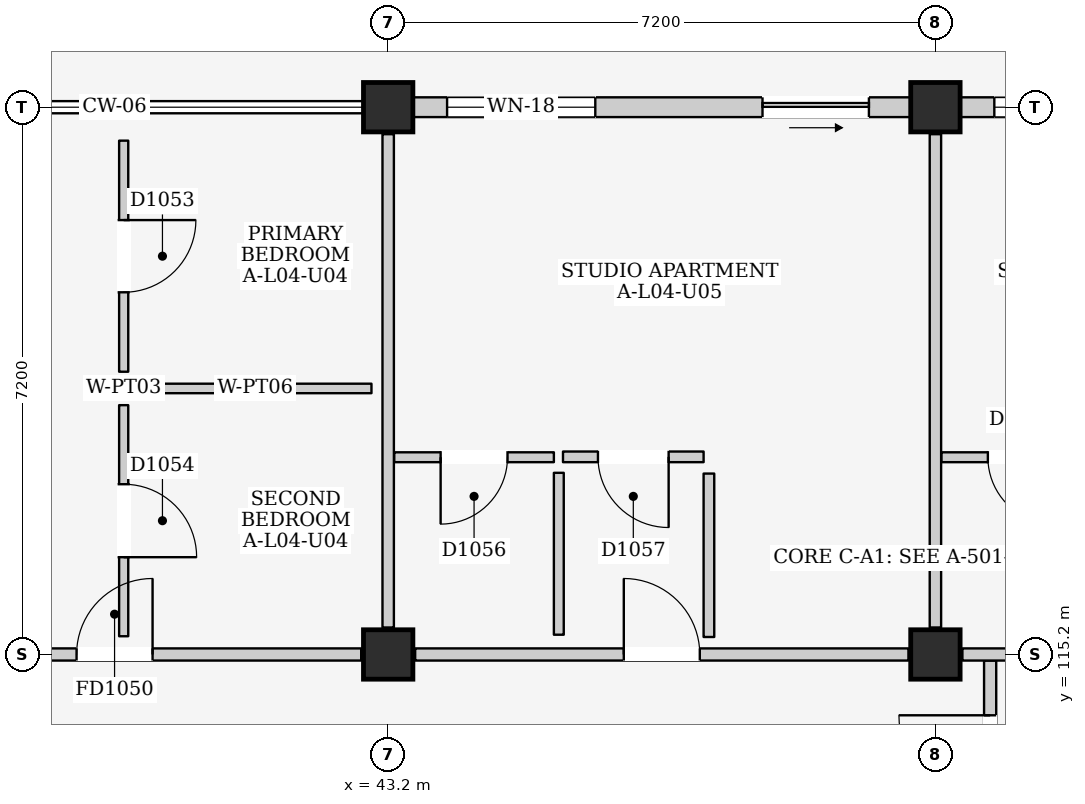
"""IFC4 building model, lengths in metres.
Left out: names, types, materials, properties, quantities, classifications, styles, units other than length and angle.
Written with IfcOpenShell. Run it as: python <this file> out.ifc"""

import sys

from ifc_helpers import new_model, si_unit, direction, frame, frame_2d, origin, origin_2d, place, context, subcontext, project, spatial, rectangle, extrude, element, fill, save


model = new_model("IFC4")
c1 = context("Model", 3, precision=1e-05, world=origin(), true_north=direction((0.0, 1.0)))
c2 = subcontext(c1, "Body", "Model", "MODEL_VIEW")
j1 = project(units=[si_unit("LENGTHUNIT", "METRE"), si_unit("PLANEANGLEUNIT", "RADIAN")], contexts=[c1])
p1 = place(None, origin())
s1 = spatial("IfcSite", under=j1, at=p1, CompositionType="ELEMENT")
p2 = place(p1, origin())
s2 = spatial("IfcBuilding", under=s1, at=p2, CompositionType="ELEMENT")
p3 = place(p2, frame((0.0, 0.0, 15.4)))
s3 = spatial("IfcBuildingStorey", under=s2, at=p3, CompositionType="ELEMENT", Elevation=15.4)
for number, where, z_axis, x_axis in (
    (1, (43.2, 115.2, 0.0), (0.0, 0.0, 1.0), (1.0, 0.0, 0.0)),
    (2, (43.2, 122.4, 0.0), (0.0, 0.0, 1.0), (1.0, 0.0, 0.0)),
    (3, (50.4, 115.2, 0.0), (0.0, 0.0, 1.0), (1.0, 0.0, 0.0)),
    (4, (50.4, 122.4, 0.0), (0.0, 0.0, 1.0), (1.0, 0.0, 0.0)),
):
    element("IfcColumn", number, at=place(p3, frame(where, z_axis=z_axis, x_axis=x_axis)), inside=s3, PredefinedType="COLUMN", context=c2, shape_type="SweptSolid", body=[
        extrude(rectangle(XDim=0.65, YDim=0.65, at=origin_2d()), origin(), (0.0, 0.0, 1.0), 3.2),
    ])
p4 = place(p3, frame((43.525, 122.4, 0.0), z_axis=(0.0, 0.0, 1.0), x_axis=(1.0, 0.0, 0.0)))
e5 = element("IfcWall", 5, at=p4, inside=s3, PredefinedType="ELEMENTEDWALL", context=c2, shape_type="SweptSolid", body=[
    extrude(rectangle(XDim=6.55, YDim=0.26, at=frame_2d((3.275, 0.0))), origin(), (0.0, 0.0, 1.0), 2.43),
])
p5 = place(p4, frame((4.6, 0.0, 0.0)))
e6 = element("IfcOpeningElement", 6, at=p5, cuts=e5, PredefinedType="OPENING", context=c2, shape_type="SweptSolid", body=[
    extrude(rectangle(XDim=1.4, YDim=2.1, at=frame_2d((0.7, 1.05))), frame((0.0, 0.145, 0.0), z_axis=(0.0, -1.0, 0.0), x_axis=(1.0, 0.0, 0.0)), (0.0, 0.0, 1.0), 0.29),
])
p6 = place(p4, frame((0.45, 0.0, 0.76)))
e7 = element("IfcOpeningElement", 7, at=p6, cuts=e5, PredefinedType="OPENING", context=c2, shape_type="SweptSolid", body=[
    extrude(rectangle(XDim=1.95, YDim=1.55, at=frame_2d((0.975, 0.775))), frame((0.0, 0.145, 0.0), z_axis=(0.0, -1.0, 0.0), x_axis=(1.0, 0.0, 0.0)), (0.0, 0.0, 1.0), 0.29),
])
p7 = place(p3, frame((50.725, 122.4, 0.0), z_axis=(0.0, 0.0, 1.0), x_axis=(1.0, 0.0, 0.0)))
e8 = element("IfcWall", 8, at=p7, inside=s3, PredefinedType="ELEMENTEDWALL", context=c2, shape_type="SweptSolid", body=[
    extrude(rectangle(XDim=6.55, YDim=0.26, at=frame_2d((3.275, 0.0))), origin(), (0.0, 0.0, 1.0), 2.43),
])
p8 = place(p7, frame((4.2, 0.0, 0.0)))
e9 = element("IfcOpeningElement", 9, at=p8, cuts=e8, PredefinedType="OPENING", context=c2, shape_type="SweptSolid", body=[
    extrude(rectangle(XDim=1.8, YDim=2.12, at=frame_2d((0.9, 1.06))), frame((0.0, 0.145, 0.0), z_axis=(0.0, -1.0, 0.0), x_axis=(1.0, 0.0, 0.0)), (0.0, 0.0, 1.0), 0.29),
])
p9 = place(p7, frame((0.45, 0.0, 0.9)))
e10 = element("IfcOpeningElement", 10, at=p9, cuts=e8, PredefinedType="OPENING", context=c2, shape_type="SweptSolid", body=[
    extrude(rectangle(XDim=1.65, YDim=1.35, at=frame_2d((0.825, 0.675))), frame((0.0, 0.145, 0.0), z_axis=(0.0, -1.0, 0.0), x_axis=(1.0, 0.0, 0.0)), (0.0, 0.0, 1.0), 0.29),
])
p10 = place(p3, frame((51.12, 111.1, 0.0), z_axis=(0.0, 0.0, 1.0), x_axis=(0.0, 1.0, 0.0)))
e11 = element("IfcWall", 11, at=p10, inside=s3, PredefinedType="PARTITIONING", context=c2, shape_type="SweptSolid", body=[
    extrude(rectangle(XDim=4.02, YDim=0.16, at=frame_2d((2.01, 0.0))), origin(), (0.0, 0.0, 1.0), 2.95),
])
p11 = place(p10, frame((2.1, 0.0, 0.0)))
e12 = element("IfcOpeningElement", 12, at=p11, cuts=e11, PredefinedType="OPENING", context=c2, shape_type="SweptSolid", body=[
    extrude(rectangle(XDim=1.2, YDim=2.2, at=frame_2d((0.6, 1.1))), frame((0.0, 0.095, 0.0), z_axis=(0.0, -1.0, 0.0), x_axis=(1.0, 0.0, 0.0)), (0.0, 0.0, 1.0), 0.19),
])
p12 = place(p3, frame((36.355, 115.2, 0.0), z_axis=(0.0, 0.0, 1.0), x_axis=(1.0, 0.0, 0.0)))
e13 = element("IfcWall", 13, at=p12, inside=s3, PredefinedType="PARTITIONING", context=c2, shape_type="SweptSolid", body=[
    extrude(rectangle(XDim=6.49, YDim=0.16, at=frame_2d((3.245, 0.0))), origin(), (0.0, 0.0, 1.0), 2.285),
])
p13 = place(p12, frame((2.745, 0.0, 0.0)))
e14 = element("IfcOpeningElement", 14, at=p13, cuts=e13, PredefinedType="OPENING", context=c2, shape_type="SweptSolid", body=[
    extrude(rectangle(XDim=1.0, YDim=2.15, at=frame_2d((0.5, 1.075))), frame((0.0, 0.095, 0.0), z_axis=(0.0, -1.0, 0.0), x_axis=(1.0, 0.0, 0.0)), (0.0, 0.0, 1.0), 0.19),
])
p14 = place(p3, frame((43.2, 115.555, 0.0), z_axis=(0.0, 0.0, 1.0), x_axis=(0.0, 1.0, 0.0)))
e15 = element("IfcWall", 15, at=p14, inside=s3, PredefinedType="PARTITIONING", context=c2, shape_type="SweptSolid", body=[
    extrude(rectangle(XDim=6.49, YDim=0.15, at=frame_2d((3.245, 0.0))), origin(), (0.0, 0.0, 1.0), 2.385),
])
p15 = place(p3, frame((39.72, 118.92, 0.0), z_axis=(0.0, 0.0, 1.0), x_axis=(0.0, 1.0, 0.0)))
e16 = element("IfcWall", 16, at=p15, inside=s3, PredefinedType="PARTITIONING", context=c2, shape_type="SweptSolid", body=[
    extrude(rectangle(XDim=3.04, YDim=0.12, at=frame_2d((1.52, 0.0))), origin(), (0.0, 0.0, 1.0), 2.95),
])
p16 = place(p15, frame((1.045, 0.0, 0.0)))
e17 = element("IfcOpeningElement", 17, at=p16, cuts=e16, PredefinedType="OPENING", context=c2, shape_type="SweptSolid", body=[
    extrude(rectangle(XDim=0.95, YDim=2.15, at=frame_2d((0.475, 1.075))), frame((0.0, 0.075, 0.0), z_axis=(0.0, -1.0, 0.0), x_axis=(1.0, 0.0, 0.0)), (0.0, 0.0, 1.0), 0.15),
])
p17 = place(p3, frame((39.92, 118.7, 0.0), z_axis=(0.0, 0.0, 1.0), x_axis=(1.0, 0.0, 0.0)))
e18 = element("IfcWall", 18, at=p17, inside=s3, PredefinedType="PARTITIONING", context=c2, shape_type="SweptSolid", body=[
    extrude(rectangle(XDim=3.06, YDim=0.125, at=frame_2d((1.53, 0.0))), origin(), (0.0, 0.0, 1.0), 2.95),
])
p18 = place(p3, frame((39.72, 115.44, 0.0), z_axis=(0.0, 0.0, 1.0), x_axis=(0.0, 1.0, 0.0)))
e19 = element("IfcWall", 19, at=p18, inside=s3, PredefinedType="PARTITIONING", context=c2, shape_type="SweptSolid", body=[
    extrude(rectangle(XDim=3.04, YDim=0.12, at=frame_2d((1.52, 0.0))), origin(), (0.0, 0.0, 1.0), 2.95),
])
p19 = place(p18, frame((1.04, 0.0, 0.0)))
e20 = element("IfcOpeningElement", 20, at=p19, cuts=e19, PredefinedType="OPENING", context=c2, shape_type="SweptSolid", body=[
    extrude(rectangle(XDim=0.96, YDim=2.15, at=frame_2d((0.48, 1.075))), frame((0.0, 0.075, 0.0), z_axis=(0.0, -1.0, 0.0), x_axis=(1.0, 0.0, 0.0)), (0.0, 0.0, 1.0), 0.15),
])
p20 = place(p3, frame((43.555, 115.2, 0.0), z_axis=(0.0, 0.0, 1.0), x_axis=(1.0, 0.0, 0.0)))
e21 = element("IfcWall", 21, at=p20, inside=s3, PredefinedType="PARTITIONING", context=c2, shape_type="SweptSolid", body=[
    extrude(rectangle(XDim=6.49, YDim=0.16, at=frame_2d((3.245, 0.0))), origin(), (0.0, 0.0, 1.0), 2.285),
])
p21 = place(p20, frame((2.745, 0.0, 0.0)))
e22 = element("IfcOpeningElement", 22, at=p21, cuts=e21, PredefinedType="OPENING", context=c2, shape_type="SweptSolid", body=[
    extrude(rectangle(XDim=1.0, YDim=2.15, at=frame_2d((0.5, 1.075))), frame((0.0, 0.095, 0.0), z_axis=(0.0, -1.0, 0.0), x_axis=(1.0, 0.0, 0.0)), (0.0, 0.0, 1.0), 0.19),
])
p22 = place(p3, frame((50.4, 115.555, 0.0), z_axis=(0.0, 0.0, 1.0), x_axis=(0.0, 1.0, 0.0)))
e23 = element("IfcWall", 23, at=p22, inside=s3, PredefinedType="PARTITIONING", context=c2, shape_type="SweptSolid", body=[
    extrude(rectangle(XDim=6.49, YDim=0.15, at=frame_2d((3.245, 0.0))), origin(), (0.0, 0.0, 1.0), 2.385),
])
p23 = place(p3, frame((43.28, 117.795, 0.0), z_axis=(0.0, 0.0, 1.0), x_axis=(1.0, 0.0, 0.0)))
e24 = element("IfcWall", 24, at=p23, inside=s3, PredefinedType="PARTITIONING", context=c2, shape_type="SweptSolid", body=[
    extrude(rectangle(XDim=2.1, YDim=0.13, at=frame_2d((1.05, 0.0))), origin(), (0.0, 0.0, 1.0), 2.95),
])
p24 = place(p23, frame((0.61, 0.0, 0.0)))
e25 = element("IfcOpeningElement", 25, at=p24, cuts=e24, PredefinedType="OPENING", context=c2, shape_type="SweptSolid", body=[
    extrude(rectangle(XDim=0.88, YDim=2.1, at=frame_2d((0.44, 1.05))), frame((0.0, 0.08, 0.0), z_axis=(0.0, -1.0, 0.0), x_axis=(1.0, 0.0, 0.0)), (0.0, 0.0, 1.0), 0.16),
])
p25 = place(p3, frame((45.445, 115.46, 0.0), z_axis=(0.0, 0.0, 1.0), x_axis=(0.0, 1.0, 0.0)))
e26 = element("IfcWall", 26, at=p25, inside=s3, PredefinedType="PARTITIONING", context=c2, shape_type="SweptSolid", body=[
    extrude(rectangle(XDim=2.13, YDim=0.13, at=frame_2d((1.065, 0.0))), origin(), (0.0, 0.0, 1.0), 2.95),
])
p26 = place(p3, frame((45.5, 117.8, 0.0), z_axis=(0.0, 0.0, 1.0), x_axis=(1.0, 0.0, 0.0)))
e27 = element("IfcWall", 27, at=p26, inside=s3, PredefinedType="PARTITIONING", context=c2, shape_type="SweptSolid", body=[
    extrude(rectangle(XDim=1.85, YDim=0.14, at=frame_2d((0.925, 0.0))), origin(), (0.0, 0.0, 1.0), 2.95),
])
p27 = place(p26, frame((0.46, 0.0, 0.0)))
e28 = element("IfcOpeningElement", 28, at=p27, cuts=e27, PredefinedType="OPENING", context=c2, shape_type="SweptSolid", body=[
    extrude(rectangle(XDim=0.93, YDim=2.14, at=frame_2d((0.465, 1.07))), frame((0.0, 0.085, 0.0), z_axis=(0.0, -1.0, 0.0), x_axis=(1.0, 0.0, 0.0)), (0.0, 0.0, 1.0), 0.17),
])
p28 = place(p3, frame((47.42, 115.43, 0.0), z_axis=(0.0, 0.0, 1.0), x_axis=(0.0, 1.0, 0.0)))
e29 = element("IfcWall", 29, at=p28, inside=s3, PredefinedType="PARTITIONING", context=c2, shape_type="SweptSolid", body=[
    extrude(rectangle(XDim=2.15, YDim=0.14, at=frame_2d((1.075, 0.0))), origin(), (0.0, 0.0, 1.0), 2.95),
])
p29 = place(p3, frame((50.755, 115.2, 0.0), z_axis=(0.0, 0.0, 1.0), x_axis=(1.0, 0.0, 0.0)))
e30 = element("IfcWall", 30, at=p29, inside=s3, PredefinedType="PARTITIONING", context=c2, shape_type="SweptSolid", body=[
    extrude(rectangle(XDim=6.49, YDim=0.16, at=frame_2d((3.245, 0.0))), origin(), (0.0, 0.0, 1.0), 2.285),
])
p30 = place(p29, frame((2.745, 0.0, 0.0)))
e31 = element("IfcOpeningElement", 31, at=p30, cuts=e30, PredefinedType="OPENING", context=c2, shape_type="SweptSolid", body=[
    extrude(rectangle(XDim=1.0, YDim=2.15, at=frame_2d((0.5, 1.075))), frame((0.0, 0.095, 0.0), z_axis=(0.0, -1.0, 0.0), x_axis=(1.0, 0.0, 0.0)), (0.0, 0.0, 1.0), 0.19),
])
p31 = place(p3, frame((50.48, 117.795, 0.0), z_axis=(0.0, 0.0, 1.0), x_axis=(1.0, 0.0, 0.0)))
e32 = element("IfcWall", 32, at=p31, inside=s3, PredefinedType="PARTITIONING", context=c2, shape_type="SweptSolid", body=[
    extrude(rectangle(XDim=2.1, YDim=0.13, at=frame_2d((1.05, 0.0))), origin(), (0.0, 0.0, 1.0), 2.95),
])
p32 = place(p31, frame((0.61, 0.0, 0.0)))
e33 = element("IfcOpeningElement", 33, at=p32, cuts=e32, PredefinedType="OPENING", context=c2, shape_type="SweptSolid", body=[
    extrude(rectangle(XDim=0.88, YDim=2.1, at=frame_2d((0.44, 1.05))), frame((0.0, 0.08, 0.0), z_axis=(0.0, -1.0, 0.0), x_axis=(1.0, 0.0, 0.0)), (0.0, 0.0, 1.0), 0.16),
])
p33 = place(p5, frame((1.4, 0.0, 0.0), z_axis=(0.0, 0.0, 1.0), x_axis=(-1.0, 0.0, 0.0)))
e34 = element("IfcDoor", 34, at=p33, inside=s3, OperationType="SLIDING_TO_RIGHT", PredefinedType="DOOR", context=c2, shape_type="SweptSolid", body=[
    extrude(rectangle(XDim=1.4, YDim=2.1, at=frame_2d((0.7, 1.05))), frame((0.0, 0.025, 0.0), z_axis=(0.0, -1.0, 0.0), x_axis=(1.0, 0.0, 0.0)), (0.0, 0.0, 1.0), 0.05),
])
fill(e6, e34)
p34 = place(p6, origin())
e35 = element("IfcWindow", 35, at=p34, inside=s3, PartitioningType="DOUBLE_PANEL_VERTICAL", PredefinedType="WINDOW", context=c2, shape_type="SweptSolid", body=[
    extrude(rectangle(XDim=1.95, YDim=1.55, at=frame_2d((0.975, 0.775))), frame((0.0, 0.03, 0.0), z_axis=(0.0, -1.0, 0.0), x_axis=(1.0, 0.0, 0.0)), (0.0, 0.0, 1.0), 0.06),
])
fill(e7, e35)
p35 = place(p9, origin())
e36 = element("IfcWindow", 36, at=p35, inside=s3, PartitioningType="DOUBLE_PANEL_VERTICAL", PredefinedType="WINDOW", context=c2, shape_type="SweptSolid", body=[
    extrude(rectangle(XDim=1.65, YDim=1.35, at=frame_2d((0.825, 0.675))), frame((0.0, 0.03, 0.0), z_axis=(0.0, -1.0, 0.0), x_axis=(1.0, 0.0, 0.0)), (0.0, 0.0, 1.0), 0.06),
])
fill(e10, e36)
p36 = place(p11, origin())
e37 = element("IfcDoor", 37, at=p36, inside=s3, OperationType="SINGLE_SWING_RIGHT", PredefinedType="DOOR", context=c2, shape_type="SweptSolid", body=[
    extrude(rectangle(XDim=1.2, YDim=2.2, at=frame_2d((0.6, 1.1))), frame((0.0, 0.025, 0.0), z_axis=(0.0, -1.0, 0.0), x_axis=(1.0, 0.0, 0.0)), (0.0, 0.0, 1.0), 0.05),
])
fill(e12, e37)
p37 = place(p13, origin())
e38 = element("IfcDoor", 38, at=p37, inside=s3, OperationType="SINGLE_SWING_RIGHT", PredefinedType="DOOR", context=c2, shape_type="SweptSolid", body=[
    extrude(rectangle(XDim=1.0, YDim=2.15, at=frame_2d((0.5, 1.075))), frame((0.0, 0.025, 0.0), z_axis=(0.0, -1.0, 0.0), x_axis=(1.0, 0.0, 0.0)), (0.0, 0.0, 1.0), 0.05),
])
fill(e14, e38)
p38 = place(p16, frame((0.95, 0.0, 0.0), z_axis=(0.0, 0.0, 1.0), x_axis=(-1.0, 0.0, 0.0)))
e39 = element("IfcDoor", 39, at=p38, inside=s3, OperationType="SINGLE_SWING_LEFT", PredefinedType="DOOR", context=c2, shape_type="SweptSolid", body=[
    extrude(rectangle(XDim=0.95, YDim=2.15, at=frame_2d((0.475, 1.075))), frame((0.0, 0.025, 0.0), z_axis=(0.0, -1.0, 0.0), x_axis=(1.0, 0.0, 0.0)), (0.0, 0.0, 1.0), 0.05),
])
fill(e17, e39)
p39 = place(p19, frame((0.96, 0.0, 0.0), z_axis=(0.0, 0.0, 1.0), x_axis=(-1.0, 0.0, 0.0)))
e40 = element("IfcDoor", 40, at=p39, inside=s3, OperationType="SINGLE_SWING_RIGHT", PredefinedType="DOOR", context=c2, shape_type="SweptSolid", body=[
    extrude(rectangle(XDim=0.96, YDim=2.15, at=frame_2d((0.48, 1.075))), frame((0.0, 0.025, 0.0), z_axis=(0.0, -1.0, 0.0), x_axis=(1.0, 0.0, 0.0)), (0.0, 0.0, 1.0), 0.05),
])
fill(e20, e40)
p40 = place(p21, origin())
e41 = element("IfcDoor", 41, at=p40, inside=s3, OperationType="SINGLE_SWING_LEFT", PredefinedType="DOOR", context=c2, shape_type="SweptSolid", body=[
    extrude(rectangle(XDim=1.0, YDim=2.15, at=frame_2d((0.5, 1.075))), frame((0.0, 0.025, 0.0), z_axis=(0.0, -1.0, 0.0), x_axis=(1.0, 0.0, 0.0)), (0.0, 0.0, 1.0), 0.05),
])
fill(e22, e41)
p41 = place(p24, frame((0.88, 0.0, 0.0), z_axis=(0.0, 0.0, 1.0), x_axis=(-1.0, 0.0, 0.0)))
e42 = element("IfcDoor", 42, at=p41, inside=s3, OperationType="SINGLE_SWING_RIGHT", PredefinedType="DOOR", context=c2, shape_type="SweptSolid", body=[
    extrude(rectangle(XDim=0.88, YDim=2.1, at=frame_2d((0.44, 1.05))), frame((0.0, 0.025, 0.0), z_axis=(0.0, -1.0, 0.0), x_axis=(1.0, 0.0, 0.0)), (0.0, 0.0, 1.0), 0.05),
])
fill(e25, e42)
p42 = place(p27, frame((0.93, 0.0, 0.0), z_axis=(0.0, 0.0, 1.0), x_axis=(-1.0, 0.0, 0.0)))
e43 = element("IfcDoor", 43, at=p42, inside=s3, OperationType="SINGLE_SWING_LEFT", PredefinedType="DOOR", context=c2, shape_type="SweptSolid", body=[
    extrude(rectangle(XDim=0.93, YDim=2.14, at=frame_2d((0.465, 1.07))), frame((0.0, 0.025, 0.0), z_axis=(0.0, -1.0, 0.0), x_axis=(1.0, 0.0, 0.0)), (0.0, 0.0, 1.0), 0.05),
])
fill(e28, e43)
p43 = place(p32, frame((0.88, 0.0, 0.0), z_axis=(0.0, 0.0, 1.0), x_axis=(-1.0, 0.0, 0.0)))
e44 = element("IfcDoor", 44, at=p43, inside=s3, OperationType="SINGLE_SWING_LEFT", PredefinedType="DOOR", context=c2, shape_type="SweptSolid", body=[
    extrude(rectangle(XDim=0.88, YDim=2.1, at=frame_2d((0.44, 1.05))), frame((0.0, 0.025, 0.0), z_axis=(0.0, -1.0, 0.0), x_axis=(1.0, 0.0, 0.0)), (0.0, 0.0, 1.0), 0.05),
])
fill(e33, e44)
save(model, sys.argv[1])
